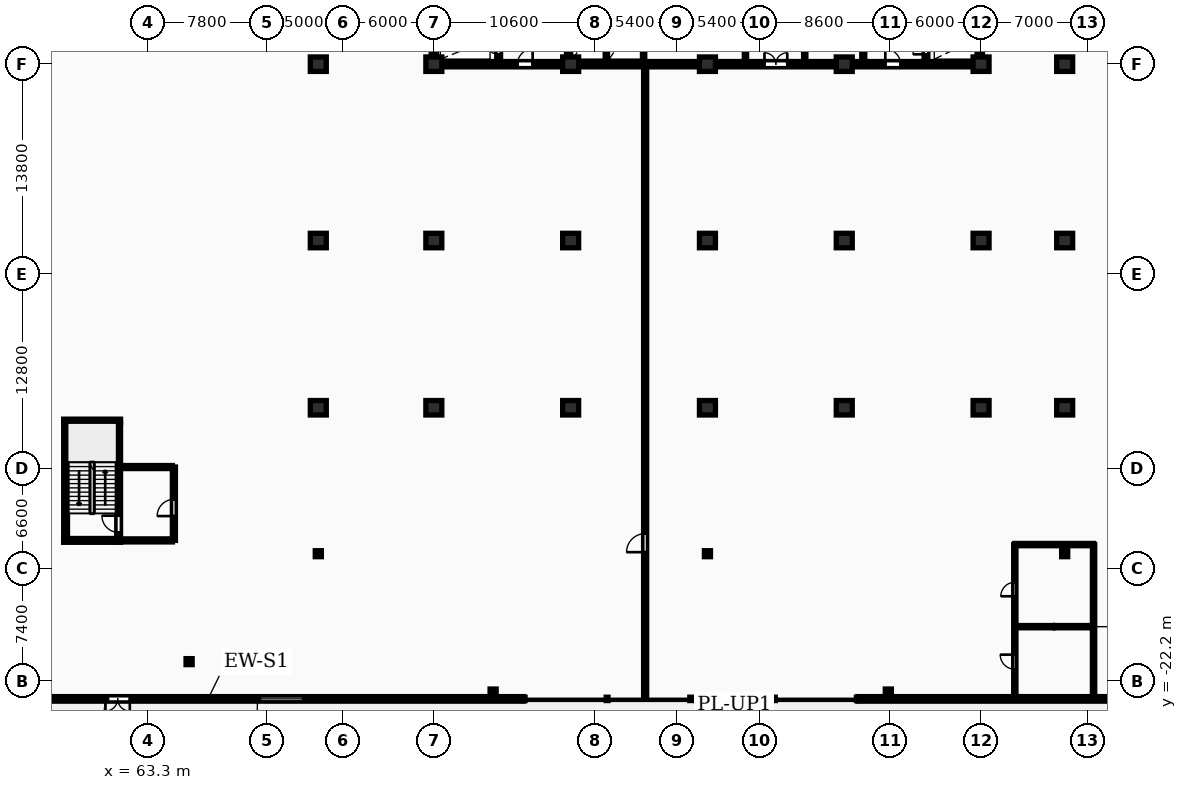
"""IFC4 building model, lengths in metres.
Left out: names, types, materials, properties, quantities, classifications, styles, units other than length and angle.
Written with IfcOpenShell. Run it as: python <this file> out.ifc"""

import sys

from ifc_helpers import new_model, si_unit, direction, frame, frame_2d, origin, origin_2d, place, context, subcontext, project, spatial, rectangle, i_section, extrude, element, fill, save


model = new_model("IFC4")
c1 = context("Model", 3, precision=1e-05, world=origin(), true_north=direction((0.0, 1.0)))
c2 = subcontext(c1, "Body", "Model", "MODEL_VIEW")
j1 = project(units=[si_unit("LENGTHUNIT", "METRE"), si_unit("PLANEANGLEUNIT", "RADIAN")], contexts=[c1])
p1 = place(None, origin())
s1 = spatial("IfcSite", under=j1, at=p1, CompositionType="ELEMENT")
p2 = place(p1, origin())
s2 = spatial("IfcBuilding", under=s1, at=p2, CompositionType="ELEMENT")
p3 = place(p2, frame((0.0, 0.0, 5.4)))
s3 = spatial("IfcBuildingStorey", under=s2, at=p3, CompositionType="ELEMENT", Elevation=5.4)
for number, where, z_axis, x_axis in (
    (1, (74.5, -4.2, 0.0), (0.0, 0.0, 1.0), (1.0, 0.0, 0.0)),
    (2, (74.5, 6.8, 0.0), (0.0, 0.0, 1.0), (1.0, 0.0, 0.0)),
    (3, (74.5, 18.4, 0.0), (0.0, 0.0, 1.0), (1.0, 0.0, 0.0)),
    (4, (82.1, -4.2, 0.0), (0.0, 0.0, 1.0), (1.0, 0.0, 0.0)),
    (5, (82.1, 6.8, 0.0), (0.0, 0.0, 1.0), (1.0, 0.0, 0.0)),
    (6, (82.1, 18.4, 0.0), (0.0, 0.0, 1.0), (1.0, 0.0, 0.0)),
    (7, (91.1, -4.2, 0.0), (0.0, 0.0, 1.0), (1.0, 0.0, 0.0)),
    (8, (91.1, 6.8, 0.0), (0.0, 0.0, 1.0), (1.0, 0.0, 0.0)),
    (9, (91.1, 18.4, 0.0), (0.0, 0.0, 1.0), (1.0, 0.0, 0.0)),
    (10, (100.1, -4.2, 0.0), (0.0, 0.0, 1.0), (1.0, 0.0, 0.0)),
    (11, (100.1, 6.8, 0.0), (0.0, 0.0, 1.0), (1.0, 0.0, 0.0)),
    (12, (100.1, 18.4, 0.0), (0.0, 0.0, 1.0), (1.0, 0.0, 0.0)),
    (13, (109.1, -4.2, 0.0), (0.0, 0.0, 1.0), (1.0, 0.0, 0.0)),
    (14, (109.1, 6.8, 0.0), (0.0, 0.0, 1.0), (1.0, 0.0, 0.0)),
    (15, (109.1, 18.4, 0.0), (0.0, 0.0, 1.0), (1.0, 0.0, 0.0)),
    (16, (118.1, -4.2, 0.0), (0.0, 0.0, 1.0), (1.0, 0.0, 0.0)),
    (17, (118.1, 6.8, 0.0), (0.0, 0.0, 1.0), (1.0, 0.0, 0.0)),
    (18, (118.1, 18.4, 0.0), (0.0, 0.0, 1.0), (1.0, 0.0, 0.0)),
    (19, (123.6, -4.2, 0.0), (0.0, 0.0, 1.0), (1.0, 0.0, 0.0)),
    (20, (123.6, 6.8, 0.0), (0.0, 0.0, 1.0), (1.0, 0.0, 0.0)),
    (21, (123.6, 18.4, 0.0), (0.0, 0.0, 1.0), (1.0, 0.0, 0.0)),
):
    element("IfcColumn", number, at=place(p3, frame(where, z_axis=z_axis, x_axis=x_axis)), inside=s3, PredefinedType="COLUMN", context=c2, shape_type="SweptSolid", body=[
        extrude(rectangle(XDim=1.05, YDim=0.95, at=origin_2d()), origin(), (0.0, 0.0, 1.0), 4.6),
    ])
for number, where, z_axis, x_axis in (
    (22, (74.5, -13.8, 0.0), (0.0, 0.0, 1.0), (1.0, 0.0, 0.0)),
    (23, (100.1, -13.8, 0.0), (0.0, 0.0, 1.0), (1.0, 0.0, 0.0)),
    (24, (123.6, -13.8, 0.0), (0.0, 0.0, 1.0), (1.0, 0.0, 0.0)),
):
    element("IfcColumn", number, at=place(p3, frame(where, z_axis=z_axis, x_axis=x_axis)), inside=s3, PredefinedType="COLUMN", context=c2, shape_type="SweptSolid", body=[
        extrude(i_section(OverallWidth=0.399, OverallDepth=0.394, WebThickness=0.023, FlangeThickness=0.037, FilletRadius=0.015, at=origin_2d()), origin(), (0.0, 0.0, 1.0), 4.6),
    ])
for number, where, z_axis, x_axis in (
    (25, (86.0, -22.9, 0.0), (0.0, 0.0, 1.0), (1.0, 0.0, 0.0)),
    (26, (112.0, -22.9, 0.0), (0.0, 0.0, 1.0), (1.0, 0.0, 0.0)),
    (27, (66.0, -20.9, 0.0), (0.0, 0.0, 1.0), (1.0, 0.0, 0.0)),
):
    element("IfcColumn", number, at=place(p3, frame(where, z_axis=z_axis, x_axis=x_axis)), inside=s3, PredefinedType="COLUMN", context=c2, shape_type="SweptSolid", body=[
        extrude(i_section(OverallWidth=0.399, OverallDepth=0.394, WebThickness=0.023, FlangeThickness=0.037, FilletRadius=0.015, at=origin_2d()), origin(), (0.0, 0.0, 1.0), 4.36),
    ])
p4 = place(p3, frame((46.5, -23.35, 0.0), z_axis=(0.0, 0.0, 1.0), x_axis=(1.0, 0.0, 0.0)))
e28 = element("IfcWall", 28, at=p4, inside=s3, PredefinedType="STANDARD", context=c2, shape_type="SweptSolid", body=[
    extrude(rectangle(XDim=41.5, YDim=0.3, at=frame_2d((20.75, 0.0))), origin(), (0.0, 0.0, 1.0), 4.3),
])
p5 = place(p4, frame((14.0, 0.0, 0.0)))
e29 = element("IfcOpeningElement", 29, at=p5, cuts=e28, PredefinedType="OPENING", context=c2, shape_type="SweptSolid", body=[
    extrude(rectangle(XDim=1.6, YDim=2.2, at=frame_2d((0.8, 1.1))), frame((0.0, 0.16, 0.0), z_axis=(0.0, -1.0, 0.0), x_axis=(1.0, 0.0, 0.0)), (0.0, 0.0, 1.0), 0.32),
])
p6 = place(p4, frame((24.0, 0.0, 0.9)))
e30 = element("IfcOpeningElement", 30, at=p6, cuts=e28, PredefinedType="OPENING", context=c2, shape_type="SweptSolid", body=[
    extrude(rectangle(XDim=3.0, YDim=2.6, at=frame_2d((1.5, 1.3))), frame((0.0, 0.16, 0.0), z_axis=(0.0, -1.0, 0.0), x_axis=(1.0, 0.0, 0.0)), (0.0, 0.0, 1.0), 0.32),
])
p7 = place(p3, frame((110.0, -23.35, 0.0), z_axis=(0.0, 0.0, 1.0), x_axis=(1.0, 0.0, 0.0)))
e31 = element("IfcWall", 31, at=p7, inside=s3, PredefinedType="STANDARD", context=c2, shape_type="SweptSolid", body=[
    extrude(rectangle(XDim=40.0, YDim=0.3, at=frame_2d((20.0, 0.0))), origin(), (0.0, 0.0, 1.0), 4.3),
])
for number, where, z_axis, x_axis in (
    (32, (82.1, 18.575, 0.0), (0.0, 0.0, 1.0), (0.0, 1.0, 0.0)),
    (33, (118.015, 18.575, 0.0), (0.0, 0.0, 1.0), (0.0, 1.0, 0.0)),
):
    element("IfcWall", number, at=place(p3, frame(where, z_axis=z_axis, x_axis=x_axis)), inside=s3, PredefinedType="SHEAR", context=c2, shape_type="SweptSolid", body=[
        extrude(rectangle(XDim=11.65, YDim=0.35, at=frame_2d((5.825, 0.0))), origin(), (0.0, 0.0, 1.0), 4.6),
    ])
p8 = place(p3, frame((81.925, 18.4, 0.0), z_axis=(0.0, 0.0, 1.0), x_axis=(1.0, 0.0, 0.0)))
e34 = element("IfcWall", 34, at=p8, inside=s3, PredefinedType="SHEAR", context=c2, shape_type="SweptSolid", body=[
    extrude(rectangle(XDim=36.265, YDim=0.35, at=frame_2d((18.132, 0.0))), origin(), (0.0, 0.0, 1.0), 4.6),
])
p9 = place(p8, frame((5.675, 0.0, 0.0)))
e35 = element("IfcOpeningElement", 35, at=p9, cuts=e34, PredefinedType="OPENING", context=c2, shape_type="SweptSolid", body=[
    extrude(rectangle(XDim=1.0, YDim=2.15, at=frame_2d((0.5, 1.075))), frame((0.0, 0.185, 0.0), z_axis=(0.0, -1.0, 0.0), x_axis=(1.0, 0.0, 0.0)), (0.0, 0.0, 1.0), 0.37),
])
p10 = place(p8, frame((21.925, 0.0, 0.0)))
e36 = element("IfcOpeningElement", 36, at=p10, cuts=e34, PredefinedType="OPENING", context=c2, shape_type="SweptSolid", body=[
    extrude(rectangle(XDim=1.5, YDim=2.2, at=frame_2d((0.75, 1.1))), frame((0.0, 0.185, 0.0), z_axis=(0.0, -1.0, 0.0), x_axis=(1.0, 0.0, 0.0)), (0.0, 0.0, 1.0), 0.37),
])
p11 = place(p8, frame((29.875, 0.0, 0.0)))
e37 = element("IfcOpeningElement", 37, at=p11, cuts=e34, PredefinedType="OPENING", context=c2, shape_type="SweptSolid", body=[
    extrude(rectangle(XDim=1.0, YDim=2.15, at=frame_2d((0.5, 1.075))), frame((0.0, 0.185, 0.0), z_axis=(0.0, -1.0, 0.0), x_axis=(1.0, 0.0, 0.0)), (0.0, 0.0, 1.0), 0.37),
])
p12 = place(p3, frame((86.365, 18.6, 0.0), z_axis=(0.0, 0.0, 1.0), x_axis=(0.0, 1.0, 0.0)))
e38 = element("IfcWall", 38, at=p12, inside=s3, PredefinedType="SHEAR", context=c2, shape_type="SweptSolid", body=[
    extrude(rectangle(XDim=11.6, YDim=0.25, at=frame_2d((5.8, 0.0))), origin(), (0.0, 0.0, 1.0), 4.6),
])
p13 = place(p12, frame((0.45, 0.0, 0.0)))
e39 = element("IfcOpeningElement", 39, at=p13, cuts=e38, PredefinedType="OPENING", context=c2, shape_type="SweptSolid", body=[
    extrude(rectangle(XDim=0.85, YDim=2.05, at=frame_2d((0.425, 1.025))), frame((0.0, 0.135, 0.0), z_axis=(0.0, -1.0, 0.0), x_axis=(1.0, 0.0, 0.0)), (0.0, 0.0, 1.0), 0.27),
])
p14 = place(p12, frame((2.05, 0.0, 0.0)))
e40 = element("IfcOpeningElement", 40, at=p14, cuts=e38, PredefinedType="OPENING", context=c2, shape_type="SweptSolid", body=[
    extrude(rectangle(XDim=1.1, YDim=2.1, at=frame_2d((0.55, 1.05))), frame((0.0, 0.135, 0.0), z_axis=(0.0, -1.0, 0.0), x_axis=(1.0, 0.0, 0.0)), (0.0, 0.0, 1.0), 0.27),
])
p15 = place(p12, frame((9.95, 0.0, 0.0)))
e41 = element("IfcOpeningElement", 41, at=p15, cuts=e38, PredefinedType="OPENING", context=c2, shape_type="SweptSolid", body=[
    extrude(rectangle(XDim=0.85, YDim=2.05, at=frame_2d((0.425, 1.025))), frame((0.0, 0.135, 0.0), z_axis=(0.0, -1.0, 0.0), x_axis=(1.0, 0.0, 0.0)), (0.0, 0.0, 1.0), 0.27),
])
p16 = place(p3, frame((90.95, 18.6, 0.0), z_axis=(0.0, 0.0, 1.0), x_axis=(0.0, 1.0, 0.0)))
e42 = element("IfcWall", 42, at=p16, inside=s3, PredefinedType="SHEAR", context=c2, shape_type="SweptSolid", body=[
    extrude(rectangle(XDim=11.6, YDim=0.25, at=frame_2d((5.8, 0.0))), origin(), (0.0, 0.0, 1.0), 4.6),
])
p17 = place(p16, frame((4.6, 0.0, 0.0)))
e43 = element("IfcOpeningElement", 43, at=p17, cuts=e42, PredefinedType="OPENING", context=c2, shape_type="SweptSolid", body=[
    extrude(rectangle(XDim=1.1, YDim=2.1, at=frame_2d((0.55, 1.05))), frame((0.0, 0.135, 0.0), z_axis=(0.0, -1.0, 0.0), x_axis=(1.0, 0.0, 0.0)), (0.0, 0.0, 1.0), 0.27),
])
for number, where, z_axis, x_axis in (
    (44, (93.45, 18.6, 0.0), (0.0, 0.0, 1.0), (0.0, 1.0, 0.0)),
    (45, (95.9, 18.6, 0.0), (0.0, 0.0, 1.0), (0.0, 1.0, 0.0)),
    (46, (102.6, 18.6, 0.0), (0.0, 0.0, 1.0), (0.0, 1.0, 0.0)),
    (47, (106.5, 18.6, 0.0), (0.0, 0.0, 1.0), (0.0, 1.0, 0.0)),
):
    element("IfcWall", number, at=place(p3, frame(where, z_axis=z_axis, x_axis=x_axis)), inside=s3, PredefinedType="PARTITIONING", context=c2, shape_type="SweptSolid", body=[
        extrude(rectangle(XDim=3.6, YDim=0.15, at=frame_2d((1.8, 0.0))), origin(), (0.0, 0.0, 1.0), 4.3),
    ])
p18 = place(p3, frame((110.35, 18.6, 0.0), z_axis=(0.0, 0.0, 1.0), x_axis=(0.0, 1.0, 0.0)))
e48 = element("IfcWall", 48, at=p18, inside=s3, PredefinedType="PARTITIONING", context=c2, shape_type="SweptSolid", body=[
    extrude(rectangle(XDim=11.6, YDim=0.2, at=frame_2d((5.8, 0.0))), origin(), (0.0, 0.0, 1.0), 4.3),
])
p19 = place(p18, frame((5.2, 0.0, 0.0)))
e49 = element("IfcOpeningElement", 49, at=p19, cuts=e48, PredefinedType="OPENING", context=c2, shape_type="SweptSolid", body=[
    extrude(rectangle(XDim=1.1, YDim=2.15, at=frame_2d((0.55, 1.075))), frame((0.0, 0.11, 0.0), z_axis=(0.0, -1.0, 0.0), x_axis=(1.0, 0.0, 0.0)), (0.0, 0.0, 1.0), 0.22),
])
p20 = place(p3, frame((114.475, 18.6, 0.0), z_axis=(0.0, 0.0, 1.0), x_axis=(0.0, 1.0, 0.0)))
e50 = element("IfcWall", 50, at=p20, inside=s3, PredefinedType="SHEAR", context=c2, shape_type="SweptSolid", body=[
    extrude(rectangle(XDim=11.6, YDim=0.25, at=frame_2d((5.8, 0.0))), origin(), (0.0, 0.0, 1.0), 4.6),
])
p21 = place(p20, frame((0.45, 0.0, 0.0)))
e51 = element("IfcOpeningElement", 51, at=p21, cuts=e50, PredefinedType="OPENING", context=c2, shape_type="SweptSolid", body=[
    extrude(rectangle(XDim=0.85, YDim=2.05, at=frame_2d((0.425, 1.025))), frame((0.0, 0.135, 0.0), z_axis=(0.0, -1.0, 0.0), x_axis=(1.0, 0.0, 0.0)), (0.0, 0.0, 1.0), 0.27),
])
p22 = place(p20, frame((2.05, 0.0, 0.0)))
e52 = element("IfcOpeningElement", 52, at=p22, cuts=e50, PredefinedType="OPENING", context=c2, shape_type="SweptSolid", body=[
    extrude(rectangle(XDim=1.1, YDim=2.1, at=frame_2d((0.55, 1.05))), frame((0.0, 0.135, 0.0), z_axis=(0.0, -1.0, 0.0), x_axis=(1.0, 0.0, 0.0)), (0.0, 0.0, 1.0), 0.27),
])
p23 = place(p20, frame((9.95, 0.0, 0.0)))
e53 = element("IfcOpeningElement", 53, at=p23, cuts=e50, PredefinedType="OPENING", context=c2, shape_type="SweptSolid", body=[
    extrude(rectangle(XDim=0.85, YDim=2.05, at=frame_2d((0.425, 1.025))), frame((0.0, 0.135, 0.0), z_axis=(0.0, -1.0, 0.0), x_axis=(1.0, 0.0, 0.0)), (0.0, 0.0, 1.0), 0.27),
])
p24 = place(p3, frame((57.875, -12.8, 0.0), z_axis=(0.0, 0.0, 1.0), x_axis=(0.0, 1.0, 0.0)))
e54 = element("IfcWall", 54, at=p24, inside=s3, PredefinedType="SHEAR", context=c2, shape_type="SweptSolid", body=[
    extrude(rectangle(XDim=7.6, YDim=0.25, at=frame_2d((3.8, 0.0))), origin(), (0.0, 0.0, 1.0), 4.6),
])
for number, where, z_axis, x_axis in (
    (55, (57.75, -12.925, 0.0), (0.0, 0.0, 1.0), (1.0, 0.0, 0.0)),
    (56, (57.75, -5.075, 0.0), (0.0, 0.0, 1.0), (1.0, 0.0, 0.0)),
):
    element("IfcWall", number, at=place(p3, frame(where, z_axis=z_axis, x_axis=x_axis)), inside=s3, PredefinedType="SHEAR", context=c2, shape_type="SweptSolid", body=[
        extrude(rectangle(XDim=3.74, YDim=0.25, at=frame_2d((1.87, 0.0))), origin(), (0.0, 0.0, 1.0), 4.6),
    ])
p25 = place(p3, frame((61.365, -12.8, 0.0), z_axis=(0.0, 0.0, 1.0), x_axis=(0.0, 1.0, 0.0)))
e57 = element("IfcWall", 57, at=p25, inside=s3, PredefinedType="SHEAR", context=c2, shape_type="SweptSolid", body=[
    extrude(rectangle(XDim=7.6, YDim=0.25, at=frame_2d((3.8, 0.0))), origin(), (0.0, 0.0, 1.0), 4.6),
])
p26 = place(p25, frame((0.4, 0.0, 0.0)))
e58 = element("IfcOpeningElement", 58, at=p26, cuts=e57, PredefinedType="OPENING", context=c2, shape_type="SweptSolid", body=[
    extrude(rectangle(XDim=1.1, YDim=2.1, at=frame_2d((0.55, 1.05))), frame((0.0, 0.135, 0.0), z_axis=(0.0, -1.0, 0.0), x_axis=(1.0, 0.0, 0.0)), (0.0, 0.0, 1.0), 0.27),
])
p27 = place(p3, frame((65.0, -12.925, 0.0), z_axis=(0.0, 0.0, 1.0), x_axis=(0.0, 1.0, 0.0)))
e59 = element("IfcWall", 59, at=p27, inside=s3, PredefinedType="PARTITIONING", context=c2, shape_type="SweptSolid", body=[
    extrude(rectangle(XDim=4.825, YDim=0.2, at=frame_2d((2.413, 0.0))), origin(), (0.0, 0.0, 1.0), 4.3),
])
p28 = place(p27, frame((1.6, 0.0, 0.0)))
e60 = element("IfcOpeningElement", 60, at=p28, cuts=e59, PredefinedType="OPENING", context=c2, shape_type="SweptSolid", body=[
    extrude(rectangle(XDim=1.1, YDim=2.15, at=frame_2d((0.55, 1.075))), frame((0.0, 0.11, 0.0), z_axis=(0.0, -1.0, 0.0), x_axis=(1.0, 0.0, 0.0)), (0.0, 0.0, 1.0), 0.22),
])
for number, where, z_axis, x_axis in (
    (61, (61.5, -12.925, 0.0), (0.0, 0.0, 1.0), (1.0, 0.0, 0.0)),
    (62, (61.5, -8.1, 0.0), (0.0, 0.0, 1.0), (1.0, 0.0, 0.0)),
):
    element("IfcWall", number, at=place(p3, frame(where, z_axis=z_axis, x_axis=x_axis)), inside=s3, PredefinedType="PARTITIONING", context=c2, shape_type="SweptSolid", body=[
        extrude(rectangle(XDim=3.4, YDim=0.2, at=frame_2d((1.7, 0.0))), origin(), (0.0, 0.0, 1.0), 4.3),
    ])
p29 = place(p3, frame((96.0, -23.2, 0.0), z_axis=(0.0, 0.0, 1.0), x_axis=(0.0, 1.0, 0.0)))
e63 = element("IfcWall", 63, at=p29, inside=s3, PredefinedType="PARTITIONING", context=c2, shape_type="SweptSolid", body=[
    extrude(rectangle(XDim=41.45, YDim=0.2, at=frame_2d((20.725, 0.0))), origin(), (0.0, 0.0, 1.0), 4.3),
])
p30 = place(p29, frame((9.5, 0.0, 0.0)))
e64 = element("IfcOpeningElement", 64, at=p30, cuts=e63, PredefinedType="OPENING", context=c2, shape_type="SweptSolid", body=[
    extrude(rectangle(XDim=1.22, YDim=2.18, at=frame_2d((0.61, 1.09))), frame((0.0, 0.11, 0.0), z_axis=(0.0, -1.0, 0.0), x_axis=(1.0, 0.0, 0.0)), (0.0, 0.0, 1.0), 0.22),
])
p31 = place(p3, frame((120.32, -23.2, 0.0), z_axis=(0.0, 0.0, 1.0), x_axis=(0.0, 1.0, 0.0)))
e65 = element("IfcWall", 65, at=p31, inside=s3, PredefinedType="PARTITIONING", context=c2, shape_type="SweptSolid", body=[
    extrude(rectangle(XDim=10.0, YDim=0.15, at=frame_2d((5.0, 0.0))), origin(), (0.0, 0.0, 1.0), 4.3),
])
p32 = place(p31, frame((1.8, 0.0, 0.0)))
e66 = element("IfcOpeningElement", 66, at=p32, cuts=e65, PredefinedType="OPENING", context=c2, shape_type="SweptSolid", body=[
    extrude(rectangle(XDim=0.96, YDim=2.1, at=frame_2d((0.48, 1.05))), frame((0.0, 0.085, 0.0), z_axis=(0.0, -1.0, 0.0), x_axis=(1.0, 0.0, 0.0)), (0.0, 0.0, 1.0), 0.17),
])
p33 = place(p31, frame((6.6, 0.0, 0.0)))
e67 = element("IfcOpeningElement", 67, at=p33, cuts=e65, PredefinedType="OPENING", context=c2, shape_type="SweptSolid", body=[
    extrude(rectangle(XDim=0.92, YDim=2.08, at=frame_2d((0.46, 1.04))), frame((0.0, 0.085, 0.0), z_axis=(0.0, -1.0, 0.0), x_axis=(1.0, 0.0, 0.0)), (0.0, 0.0, 1.0), 0.17),
])
for number, where, z_axis, x_axis in (
    (68, (120.32, -18.6, 0.0), (0.0, 0.0, 1.0), (1.0, 0.0, 0.0)),
    (69, (120.32, -13.2, 0.0), (0.0, 0.0, 1.0), (1.0, 0.0, 0.0)),
):
    element("IfcWall", number, at=place(p3, frame(where, z_axis=z_axis, x_axis=x_axis)), inside=s3, PredefinedType="PARTITIONING", context=c2, shape_type="SweptSolid", body=[
        extrude(rectangle(XDim=5.18, YDim=0.15, at=frame_2d((2.59, 0.0))), origin(), (0.0, 0.0, 1.0), 4.3),
    ])
p34 = place(p3, frame((125.5, -23.2, 0.0), z_axis=(0.0, 0.0, 1.0), x_axis=(0.0, 1.0, 0.0)))
e70 = element("IfcWall", 70, at=p34, inside=s3, PredefinedType="PARTITIONING", context=c2, shape_type="SweptSolid", body=[
    extrude(rectangle(XDim=10.0, YDim=0.15, at=frame_2d((5.0, 0.0))), origin(), (0.0, 0.0, 1.0), 4.3),
])
p35 = place(p5, frame((1.6, 0.0, 0.0), z_axis=(0.0, 0.0, 1.0), x_axis=(-1.0, 0.0, 0.0)))
e71 = element("IfcDoor", 71, at=p35, inside=s3, OperationType="DOUBLE_DOOR_SINGLE_SWING", PredefinedType="DOOR", context=c2, shape_type="SweptSolid", body=[
    extrude(rectangle(XDim=1.6, YDim=2.2, at=frame_2d((0.8, 1.1))), frame((0.0, 0.025, 0.0), z_axis=(0.0, -1.0, 0.0), x_axis=(1.0, 0.0, 0.0)), (0.0, 0.0, 1.0), 0.05),
])
fill(e29, e71)
p36 = place(p6, origin())
e72 = element("IfcWindow", 72, at=p36, inside=s3, PartitioningType="TRIPLE_PANEL_VERTICAL", PredefinedType="WINDOW", context=c2, shape_type="SweptSolid", body=[
    extrude(rectangle(XDim=3.0, YDim=2.6, at=frame_2d((1.5, 1.3))), frame((0.0, 0.03, 0.0), z_axis=(0.0, -1.0, 0.0), x_axis=(1.0, 0.0, 0.0)), (0.0, 0.0, 1.0), 0.06),
])
fill(e30, e72)
p37 = place(p9, origin())
e73 = element("IfcDoor", 73, at=p37, inside=s3, OperationType="SINGLE_SWING_RIGHT", PredefinedType="DOOR", context=c2, shape_type="SweptSolid", body=[
    extrude(rectangle(XDim=1.0, YDim=2.15, at=frame_2d((0.5, 1.075))), frame((0.0, 0.025, 0.0), z_axis=(0.0, -1.0, 0.0), x_axis=(1.0, 0.0, 0.0)), (0.0, 0.0, 1.0), 0.05),
])
fill(e35, e73)
p38 = place(p10, origin())
e74 = element("IfcDoor", 74, at=p38, inside=s3, OperationType="DOUBLE_DOOR_SINGLE_SWING", PredefinedType="DOOR", context=c2, shape_type="SweptSolid", body=[
    extrude(rectangle(XDim=1.5, YDim=2.2, at=frame_2d((0.75, 1.1))), frame((0.0, 0.025, 0.0), z_axis=(0.0, -1.0, 0.0), x_axis=(1.0, 0.0, 0.0)), (0.0, 0.0, 1.0), 0.05),
])
fill(e36, e74)
p39 = place(p11, origin())
e75 = element("IfcDoor", 75, at=p39, inside=s3, OperationType="SINGLE_SWING_LEFT", PredefinedType="DOOR", context=c2, shape_type="SweptSolid", body=[
    extrude(rectangle(XDim=1.0, YDim=2.15, at=frame_2d((0.5, 1.075))), frame((0.0, 0.025, 0.0), z_axis=(0.0, -1.0, 0.0), x_axis=(1.0, 0.0, 0.0)), (0.0, 0.0, 1.0), 0.05),
])
fill(e37, e75)
p40 = place(p13, origin())
e76 = element("IfcDoor", 76, at=p40, inside=s3, OperationType="SINGLE_SWING_RIGHT", PredefinedType="DOOR", context=c2, shape_type="SweptSolid", body=[
    extrude(rectangle(XDim=0.85, YDim=2.05, at=frame_2d((0.425, 1.025))), frame((0.0, 0.025, 0.0), z_axis=(0.0, -1.0, 0.0), x_axis=(1.0, 0.0, 0.0)), (0.0, 0.0, 1.0), 0.05),
])
fill(e39, e76)
p41 = place(p21, origin())
e77 = element("IfcDoor", 77, at=p41, inside=s3, OperationType="SINGLE_SWING_LEFT", PredefinedType="DOOR", context=c2, shape_type="SweptSolid", body=[
    extrude(rectangle(XDim=0.85, YDim=2.05, at=frame_2d((0.425, 1.025))), frame((0.0, 0.025, 0.0), z_axis=(0.0, -1.0, 0.0), x_axis=(1.0, 0.0, 0.0)), (0.0, 0.0, 1.0), 0.05),
])
fill(e51, e77)
p42 = place(p26, origin())
e78 = element("IfcDoor", 78, at=p42, inside=s3, OperationType="SINGLE_SWING_RIGHT", PredefinedType="DOOR", context=c2, shape_type="SweptSolid", body=[
    extrude(rectangle(XDim=1.1, YDim=2.1, at=frame_2d((0.55, 1.05))), frame((0.0, 0.025, 0.0), z_axis=(0.0, -1.0, 0.0), x_axis=(1.0, 0.0, 0.0)), (0.0, 0.0, 1.0), 0.05),
])
fill(e58, e78)
p43 = place(p28, origin())
e79 = element("IfcDoor", 79, at=p43, inside=s3, OperationType="SINGLE_SWING_LEFT", PredefinedType="DOOR", context=c2, shape_type="SweptSolid", body=[
    extrude(rectangle(XDim=1.1, YDim=2.15, at=frame_2d((0.55, 1.075))), frame((0.0, 0.025, 0.0), z_axis=(0.0, -1.0, 0.0), x_axis=(1.0, 0.0, 0.0)), (0.0, 0.0, 1.0), 0.05),
])
fill(e60, e79)
p44 = place(p30, origin())
e80 = element("IfcDoor", 80, at=p44, inside=s3, OperationType="SINGLE_SWING_LEFT", PredefinedType="DOOR", context=c2, shape_type="SweptSolid", body=[
    extrude(rectangle(XDim=1.22, YDim=2.18, at=frame_2d((0.61, 1.09))), frame((0.0, 0.025, 0.0), z_axis=(0.0, -1.0, 0.0), x_axis=(1.0, 0.0, 0.0)), (0.0, 0.0, 1.0), 0.05),
])
fill(e64, e80)
p45 = place(p32, origin())
e81 = element("IfcDoor", 81, at=p45, inside=s3, OperationType="SINGLE_SWING_RIGHT", PredefinedType="DOOR", context=c2, shape_type="SweptSolid", body=[
    extrude(rectangle(XDim=0.96, YDim=2.1, at=frame_2d((0.48, 1.05))), frame((0.0, 0.025, 0.0), z_axis=(0.0, -1.0, 0.0), x_axis=(1.0, 0.0, 0.0)), (0.0, 0.0, 1.0), 0.05),
])
fill(e66, e81)
p46 = place(p33, origin())
e82 = element("IfcDoor", 82, at=p46, inside=s3, OperationType="SINGLE_SWING_LEFT", PredefinedType="DOOR", context=c2, shape_type="SweptSolid", body=[
    extrude(rectangle(XDim=0.92, YDim=2.08, at=frame_2d((0.46, 1.04))), frame((0.0, 0.025, 0.0), z_axis=(0.0, -1.0, 0.0), x_axis=(1.0, 0.0, 0.0)), (0.0, 0.0, 1.0), 0.05),
])
fill(e67, e82)
save(model, sys.argv[1])
